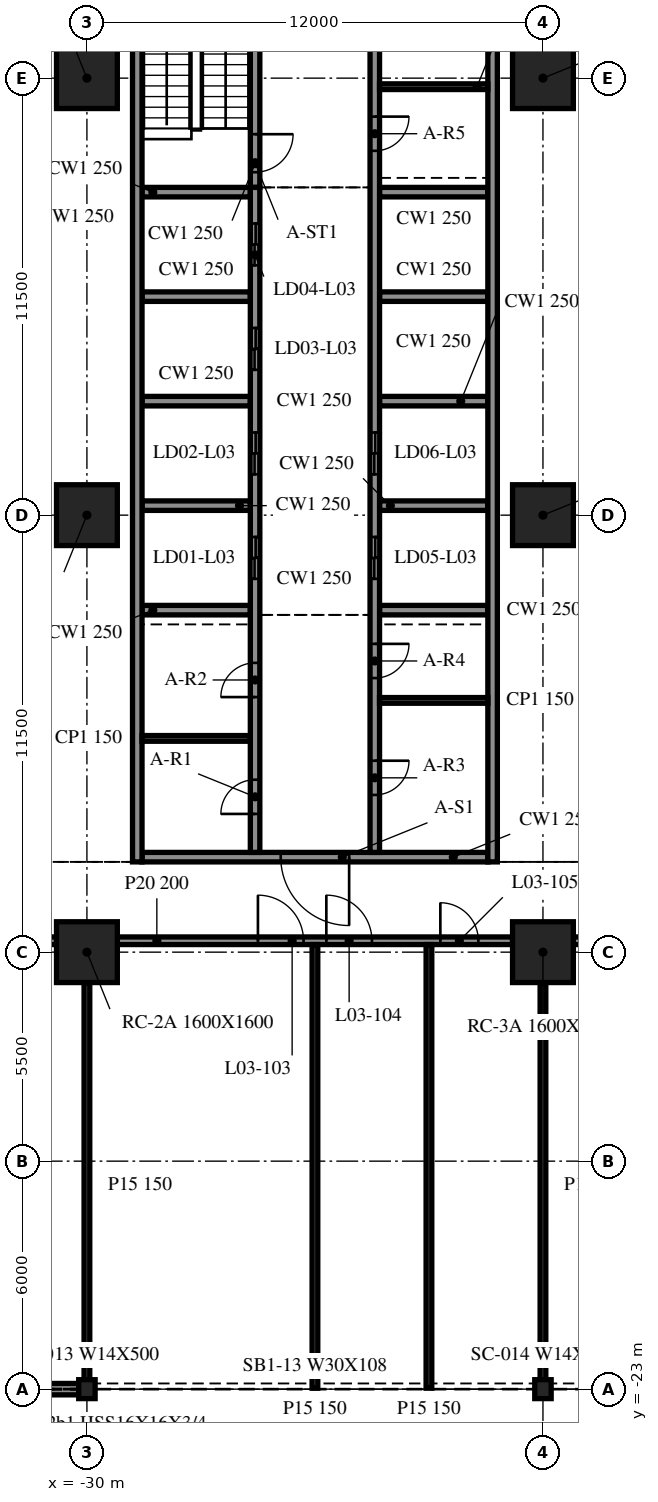
"""IFC4 building model, lengths in metres.
Left out: names, types, materials, properties, quantities, classifications, styles, units other than length and angle.
Written with IfcOpenShell. Run it as: python <this file> out.ifc"""

import sys

from ifc_helpers import new_model, si_unit, direction, frame, frame_2d, origin, origin_2d, place, context, subcontext, project, spatial, rectangle, i_section, extrude, element, fill, save


model = new_model("IFC4")
c1 = context("Model", 3, precision=1e-05, world=origin(), true_north=direction((0.0, 1.0)))
c2 = subcontext(c1, "Body", "Model", "MODEL_VIEW")
j1 = project(units=[si_unit("LENGTHUNIT", "METRE"), si_unit("PLANEANGLEUNIT", "RADIAN")], contexts=[c1])
p1 = place(None, origin())
s1 = spatial("IfcSite", under=j1, at=p1, CompositionType="ELEMENT")
p2 = place(p1, origin())
s2 = spatial("IfcBuilding", under=s1, at=p2, CompositionType="ELEMENT")
p3 = place(p2, frame((0.0, 0.0, 15.8)))
s3 = spatial("IfcBuildingStorey", under=s2, at=p3, CompositionType="ELEMENT", Elevation=15.8)
for number, where, z_axis, x_axis in (
    (1, (-30.0, -11.5, -0.34), (0.0, 0.0, 1.0), (1.0, 0.0, 0.0)),
    (2, (-30.0, 0.0, -0.34), (0.0, 0.0, 1.0), (1.0, 0.0, 0.0)),
    (3, (-30.0, 11.5, -0.34), (0.0, 0.0, 1.0), (1.0, 0.0, 0.0)),
    (4, (-18.0, -11.5, -0.34), (0.0, 0.0, 1.0), (1.0, 0.0, 0.0)),
    (5, (-18.0, 0.0, -0.34), (0.0, 0.0, 1.0), (1.0, 0.0, 0.0)),
    (6, (-18.0, 11.5, -0.34), (0.0, 0.0, 1.0), (1.0, 0.0, 0.0)),
):
    element("IfcColumn", number, at=place(p3, frame(where, z_axis=z_axis, x_axis=x_axis)), inside=s3, PredefinedType="COLUMN", context=c2, shape_type="SweptSolid", body=[
        extrude(rectangle(XDim=1.6, YDim=1.6, at=origin_2d()), origin(), (0.0, 0.0, 1.0), 4.3),
    ])
for number, where, z_axis, x_axis in (
    (7, (-30.0, -23.0, -0.34), (0.0, 0.0, 1.0), (1.0, 0.0, 0.0)),
    (8, (-18.0, -23.0, -0.34), (0.0, 0.0, 1.0), (1.0, 0.0, 0.0)),
):
    element("IfcColumn", number, at=place(p3, frame(where, z_axis=z_axis, x_axis=x_axis)), inside=s3, PredefinedType="COLUMN", context=c2, shape_type="SweptSolid", body=[
        extrude(i_section(OverallWidth=0.432, OverallDepth=0.498, WebThickness=0.056, FlangeThickness=0.089, at=origin_2d()), origin(), (0.0, 0.0, 1.0), 4.3),
    ])
p4 = place(p3, frame((-41.972, -23.0, 0.0), z_axis=(0.0, 0.0, 1.0), x_axis=(1.0, 0.0, 0.0)))
e9 = element("IfcWall", 9, at=p4, inside=s3, PredefinedType="NOTDEFINED", context=c2, shape_type="SweptSolid", body=[
    extrude(rectangle(XDim=11.944, YDim=0.3, at=frame_2d((5.972, 0.0))), origin(), (0.0, 0.0, 1.0), 3.203),
])
for number, where, z_axis, x_axis in (
    (10, (-28.675, 15.125, 0.0), (0.0, 0.0, 1.0), (0.0, -1.0, 0.0)),
    (11, (-19.325, -9.125, 0.0), (0.0, 0.0, 1.0), (0.0, 1.0, 0.0)),
):
    element("IfcWall", number, at=place(p3, frame(where, z_axis=z_axis, x_axis=x_axis)), inside=s3, PredefinedType="SOLIDWALL", context=c2, shape_type="SweptSolid", body=[
        extrude(rectangle(XDim=24.25, YDim=0.25, at=frame_2d((12.125, 0.0))), origin(), (0.0, 0.0, 1.0), 3.96),
    ])
p5 = place(p3, frame((-19.45, -9.0, 0.0), z_axis=(0.0, 0.0, 1.0), x_axis=(-1.0, 0.0, 0.0)))
e12 = element("IfcWall", 12, at=p5, inside=s3, PredefinedType="SOLIDWALL", context=c2, shape_type="SweptSolid", body=[
    extrude(rectangle(XDim=9.1, YDim=0.25, at=frame_2d((4.55, 0.0))), origin(), (0.0, 0.0, 1.0), 3.96),
])
p6 = place(p5, frame((3.65, 0.0, 0.0)))
e13 = element("IfcOpeningElement", 13, at=p6, cuts=e12, PredefinedType="OPENING", context=c2, shape_type="SweptSolid", body=[
    extrude(rectangle(XDim=1.8, YDim=2.1, at=frame_2d((0.9, 1.05))), frame((0.0, 0.135, 0.0), z_axis=(0.0, -1.0, 0.0), x_axis=(1.0, 0.0, 0.0)), (0.0, 0.0, 1.0), 0.27),
])
p7 = place(p3, frame((-25.575, -8.875, 0.0), z_axis=(0.0, 0.0, 1.0), x_axis=(0.0, 1.0, 0.0)))
e14 = element("IfcWall", 14, at=p7, inside=s3, PredefinedType="SOLIDWALL", context=c2, shape_type="SweptSolid", body=[
    extrude(rectangle(XDim=17.5, YDim=0.25, at=frame_2d((8.75, 0.0))), origin(), (0.0, 0.0, 1.0), 3.96),
])
p8 = place(p7, frame((7.2, 0.0, 0.0)))
e15 = element("IfcOpeningElement", 15, at=p8, cuts=e14, PredefinedType="OPENING", context=c2, shape_type="SweptSolid", body=[
    extrude(rectangle(XDim=1.1, YDim=2.1, at=frame_2d((0.55, 1.05))), frame((0.0, 0.135, 0.0), z_axis=(0.0, -1.0, 0.0), x_axis=(1.0, 0.0, 0.0)), (0.0, 0.0, 1.0), 0.27),
])
p9 = place(p7, frame((9.95, 0.0, 0.0)))
e16 = element("IfcOpeningElement", 16, at=p9, cuts=e14, PredefinedType="OPENING", context=c2, shape_type="SweptSolid", body=[
    extrude(rectangle(XDim=1.1, YDim=2.1, at=frame_2d((0.55, 1.05))), frame((0.0, 0.135, 0.0), z_axis=(0.0, -1.0, 0.0), x_axis=(1.0, 0.0, 0.0)), (0.0, 0.0, 1.0), 0.27),
])
p10 = place(p7, frame((12.7, 0.0, 0.0)))
e17 = element("IfcOpeningElement", 17, at=p10, cuts=e14, PredefinedType="OPENING", context=c2, shape_type="SweptSolid", body=[
    extrude(rectangle(XDim=1.1, YDim=2.1, at=frame_2d((0.55, 1.05))), frame((0.0, 0.135, 0.0), z_axis=(0.0, -1.0, 0.0), x_axis=(1.0, 0.0, 0.0)), (0.0, 0.0, 1.0), 0.27),
])
p11 = place(p7, frame((15.45, 0.0, 0.0)))
e18 = element("IfcOpeningElement", 18, at=p11, cuts=e14, PredefinedType="OPENING", context=c2, shape_type="SweptSolid", body=[
    extrude(rectangle(XDim=1.1, YDim=2.1, at=frame_2d((0.55, 1.05))), frame((0.0, 0.135, 0.0), z_axis=(0.0, -1.0, 0.0), x_axis=(1.0, 0.0, 0.0)), (0.0, 0.0, 1.0), 0.27),
])
p12 = place(p7, frame((1.012, 0.0, 0.0)))
e19 = element("IfcOpeningElement", 19, at=p12, cuts=e14, PredefinedType="OPENING", context=c2, shape_type="SweptSolid", body=[
    extrude(rectangle(XDim=0.9, YDim=2.1, at=frame_2d((0.45, 1.05))), frame((0.0, 0.135, 0.0), z_axis=(0.0, -1.0, 0.0), x_axis=(1.0, 0.0, 0.0)), (0.0, 0.0, 1.0), 0.27),
])
p13 = place(p7, frame((4.087, 0.0, 0.0)))
e20 = element("IfcOpeningElement", 20, at=p13, cuts=e14, PredefinedType="OPENING", context=c2, shape_type="SweptSolid", body=[
    extrude(rectangle(XDim=0.9, YDim=2.1, at=frame_2d((0.45, 1.05))), frame((0.0, 0.135, 0.0), z_axis=(0.0, -1.0, 0.0), x_axis=(1.0, 0.0, 0.0)), (0.0, 0.0, 1.0), 0.27),
])
p14 = place(p3, frame((-25.575, 14.875, 0.0), z_axis=(0.0, 0.0, 1.0), x_axis=(0.0, -1.0, 0.0)))
e21 = element("IfcWall", 21, at=p14, inside=s3, PredefinedType="SOLIDWALL", context=c2, shape_type="SweptSolid", body=[
    extrude(rectangle(XDim=6.25, YDim=0.25, at=frame_2d((3.125, 0.0))), origin(), (0.0, 0.0, 1.0), 3.96),
])
p15 = place(p14, frame((4.85, 0.0, 0.0)))
e22 = element("IfcOpeningElement", 22, at=p15, cuts=e21, PredefinedType="OPENING", context=c2, shape_type="SweptSolid", body=[
    extrude(rectangle(XDim=1.0, YDim=2.1, at=frame_2d((0.5, 1.05))), frame((0.0, 0.135, 0.0), z_axis=(0.0, -1.0, 0.0), x_axis=(1.0, 0.0, 0.0)), (0.0, 0.0, 1.0), 0.27),
])
p16 = place(p3, frame((-22.425, 14.875, 0.0), z_axis=(0.0, 0.0, 1.0), x_axis=(0.0, -1.0, 0.0)))
e23 = element("IfcWall", 23, at=p16, inside=s3, PredefinedType="SOLIDWALL", context=c2, shape_type="SweptSolid", body=[
    extrude(rectangle(XDim=23.75, YDim=0.25, at=frame_2d((11.875, 0.0))), origin(), (0.0, 0.0, 1.0), 3.96),
])
p17 = place(p16, frame((15.45, 0.0, 0.0)))
e24 = element("IfcOpeningElement", 24, at=p17, cuts=e23, PredefinedType="OPENING", context=c2, shape_type="SweptSolid", body=[
    extrude(rectangle(XDim=1.1, YDim=2.1, at=frame_2d((0.55, 1.05))), frame((0.0, 0.135, 0.0), z_axis=(0.0, -1.0, 0.0), x_axis=(1.0, 0.0, 0.0)), (0.0, 0.0, 1.0), 0.27),
])
p18 = place(p16, frame((12.7, 0.0, 0.0)))
e25 = element("IfcOpeningElement", 25, at=p18, cuts=e23, PredefinedType="OPENING", context=c2, shape_type="SweptSolid", body=[
    extrude(rectangle(XDim=1.1, YDim=2.1, at=frame_2d((0.55, 1.05))), frame((0.0, 0.135, 0.0), z_axis=(0.0, -1.0, 0.0), x_axis=(1.0, 0.0, 0.0)), (0.0, 0.0, 1.0), 0.27),
])
p19 = place(p16, frame((21.337, 0.0, 0.0)))
e26 = element("IfcOpeningElement", 26, at=p19, cuts=e23, PredefinedType="OPENING", context=c2, shape_type="SweptSolid", body=[
    extrude(rectangle(XDim=0.9, YDim=2.1, at=frame_2d((0.45, 1.05))), frame((0.0, 0.135, 0.0), z_axis=(0.0, -1.0, 0.0), x_axis=(1.0, 0.0, 0.0)), (0.0, 0.0, 1.0), 0.27),
])
p20 = place(p16, frame((18.262, 0.0, 0.0)))
e27 = element("IfcOpeningElement", 27, at=p20, cuts=e23, PredefinedType="OPENING", context=c2, shape_type="SweptSolid", body=[
    extrude(rectangle(XDim=0.9, YDim=2.1, at=frame_2d((0.45, 1.05))), frame((0.0, 0.135, 0.0), z_axis=(0.0, -1.0, 0.0), x_axis=(1.0, 0.0, 0.0)), (0.0, 0.0, 1.0), 0.27),
])
p21 = place(p16, frame((4.387, 0.0, 0.0)))
e28 = element("IfcOpeningElement", 28, at=p21, cuts=e23, PredefinedType="OPENING", context=c2, shape_type="SweptSolid", body=[
    extrude(rectangle(XDim=0.9, YDim=2.1, at=frame_2d((0.45, 1.05))), frame((0.0, 0.135, 0.0), z_axis=(0.0, -1.0, 0.0), x_axis=(1.0, 0.0, 0.0)), (0.0, 0.0, 1.0), 0.27),
])
p22 = place(p16, frame((1.312, 0.0, 0.0)))
e29 = element("IfcOpeningElement", 29, at=p22, cuts=e23, PredefinedType="OPENING", context=c2, shape_type="SweptSolid", body=[
    extrude(rectangle(XDim=0.9, YDim=2.1, at=frame_2d((0.45, 1.05))), frame((0.0, 0.135, 0.0), z_axis=(0.0, -1.0, 0.0), x_axis=(1.0, 0.0, 0.0)), (0.0, 0.0, 1.0), 0.27),
])
for number, where, z_axis, x_axis in (
    (30, (-28.55, -2.5, 0.0), (0.0, 0.0, 1.0), (1.0, 0.0, 0.0)),
    (31, (-28.55, 0.25, 0.0), (0.0, 0.0, 1.0), (1.0, 0.0, 0.0)),
    (32, (-28.55, 3.0, 0.0), (0.0, 0.0, 1.0), (1.0, 0.0, 0.0)),
    (33, (-28.55, 5.75, 0.0), (0.0, 0.0, 1.0), (1.0, 0.0, 0.0)),
    (34, (-28.55, 8.5, 0.0), (0.0, 0.0, 1.0), (1.0, 0.0, 0.0)),
    (35, (-22.3, -2.5, 0.0), (0.0, 0.0, 1.0), (1.0, 0.0, 0.0)),
    (36, (-22.3, 0.25, 0.0), (0.0, 0.0, 1.0), (1.0, 0.0, 0.0)),
    (37, (-22.3, 3.0, 0.0), (0.0, 0.0, 1.0), (1.0, 0.0, 0.0)),
    (38, (-22.3, 5.75, 0.0), (0.0, 0.0, 1.0), (1.0, 0.0, 0.0)),
    (39, (-22.3, 8.5, 0.0), (0.0, 0.0, 1.0), (1.0, 0.0, 0.0)),
):
    element("IfcWall", number, at=place(p3, frame(where, z_axis=z_axis, x_axis=x_axis)), inside=s3, PredefinedType="SOLIDWALL", context=c2, shape_type="SweptSolid", body=[
        extrude(rectangle(XDim=2.85, YDim=0.25, at=frame_2d((1.425, 0.0))), origin(), (0.0, 0.0, 1.0), 3.96),
    ])
for number, where, z_axis, x_axis in (
    (40, (-28.55, -5.875, 0.0), (0.0, 0.0, 1.0), (1.0, 0.0, 0.0)),
    (41, (-22.3, -4.875, 0.0), (0.0, 0.0, 1.0), (1.0, 0.0, 0.0)),
    (42, (-22.3, 11.275, 0.0), (0.0, 0.0, 1.0), (1.0, 0.0, 0.0)),
):
    element("IfcWall", number, at=place(p3, frame(where, z_axis=z_axis, x_axis=x_axis)), inside=s3, PredefinedType="PARTITIONING", context=c2, shape_type="SweptSolid", body=[
        extrude(rectangle(XDim=2.85, YDim=0.15, at=frame_2d((1.425, 0.0))), origin(), (0.0, 0.0, 1.0), 3.96),
    ])
p23 = place(p3, frame((-41.2, -11.2, 0.0), z_axis=(0.0, 0.0, 1.0), x_axis=(1.0, 0.0, 0.0)))
e43 = element("IfcWall", 43, at=p23, inside=s3, PredefinedType="PARTITIONING", context=c2, shape_type="SweptSolid", body=[
    extrude(rectangle(XDim=10.4, YDim=0.2, at=frame_2d((5.2, 0.0))), origin(), (0.0, 0.0, 1.0), 3.96),
])
p24 = place(p23, frame((5.5, 0.0, 0.0)))
e44 = element("IfcOpeningElement", 44, at=p24, cuts=e43, PredefinedType="OPENING", context=c2, shape_type="SweptSolid", body=[
    extrude(rectangle(XDim=1.2, YDim=2.1, at=frame_2d((0.6, 1.05))), frame((0.0, 0.11, 0.0), z_axis=(0.0, -1.0, 0.0), x_axis=(1.0, 0.0, 0.0)), (0.0, 0.0, 1.0), 0.22),
])
p25 = place(p3, frame((-29.2, -11.2, 0.0), z_axis=(0.0, 0.0, 1.0), x_axis=(1.0, 0.0, 0.0)))
e45 = element("IfcWall", 45, at=p25, inside=s3, PredefinedType="PARTITIONING", context=c2, shape_type="SweptSolid", body=[
    extrude(rectangle(XDim=10.4, YDim=0.2, at=frame_2d((5.2, 0.0))), origin(), (0.0, 0.0, 1.0), 3.96),
])
p26 = place(p25, frame((3.7, 0.0, 0.0)))
e46 = element("IfcOpeningElement", 46, at=p26, cuts=e45, PredefinedType="OPENING", context=c2, shape_type="SweptSolid", body=[
    extrude(rectangle(XDim=1.2, YDim=2.1, at=frame_2d((0.6, 1.05))), frame((0.0, 0.11, 0.0), z_axis=(0.0, -1.0, 0.0), x_axis=(1.0, 0.0, 0.0)), (0.0, 0.0, 1.0), 0.22),
])
p27 = place(p25, frame((5.5, 0.0, 0.0)))
e47 = element("IfcOpeningElement", 47, at=p27, cuts=e45, PredefinedType="OPENING", context=c2, shape_type="SweptSolid", body=[
    extrude(rectangle(XDim=1.2, YDim=2.1, at=frame_2d((0.6, 1.05))), frame((0.0, 0.11, 0.0), z_axis=(0.0, -1.0, 0.0), x_axis=(1.0, 0.0, 0.0)), (0.0, 0.0, 1.0), 0.22),
])
p28 = place(p25, frame((8.5, 0.0, 0.0)))
e48 = element("IfcOpeningElement", 48, at=p28, cuts=e45, PredefinedType="OPENING", context=c2, shape_type="SweptSolid", body=[
    extrude(rectangle(XDim=1.0, YDim=2.1, at=frame_2d((0.5, 1.05))), frame((0.0, 0.11, 0.0), z_axis=(0.0, -1.0, 0.0), x_axis=(1.0, 0.0, 0.0)), (0.0, 0.0, 1.0), 0.22),
])
p29 = place(p3, frame((-17.2, -11.2, 0.0), z_axis=(0.0, 0.0, 1.0), x_axis=(1.0, 0.0, 0.0)))
e49 = element("IfcWall", 49, at=p29, inside=s3, PredefinedType="PARTITIONING", context=c2, shape_type="SweptSolid", body=[
    extrude(rectangle(XDim=10.4, YDim=0.2, at=frame_2d((5.2, 0.0))), origin(), (0.0, 0.0, 1.0), 3.96),
])
p30 = place(p29, frame((3.7, 0.0, 0.0)))
e50 = element("IfcOpeningElement", 50, at=p30, cuts=e49, PredefinedType="OPENING", context=c2, shape_type="SweptSolid", body=[
    extrude(rectangle(XDim=1.2, YDim=2.1, at=frame_2d((0.6, 1.05))), frame((0.0, 0.11, 0.0), z_axis=(0.0, -1.0, 0.0), x_axis=(1.0, 0.0, 0.0)), (0.0, 0.0, 1.0), 0.22),
])
p31 = place(p29, frame((5.5, 0.0, 0.0)))
e51 = element("IfcOpeningElement", 51, at=p31, cuts=e49, PredefinedType="OPENING", context=c2, shape_type="SweptSolid", body=[
    extrude(rectangle(XDim=1.2, YDim=2.1, at=frame_2d((0.6, 1.05))), frame((0.0, 0.11, 0.0), z_axis=(0.0, -1.0, 0.0), x_axis=(1.0, 0.0, 0.0)), (0.0, 0.0, 1.0), 0.22),
])
p32 = place(p3, frame((-30.0, -22.975, 0.0), z_axis=(0.0, 0.0, 1.0), x_axis=(0.0, 1.0, 0.0)))
e52 = element("IfcWall", 52, at=p32, inside=s3, PredefinedType="PARTITIONING", context=c2, shape_type="SweptSolid", body=[
    extrude(rectangle(XDim=10.675, YDim=0.15, at=frame_2d((5.337, 0.0))), origin(), (0.0, 0.0, 1.0), 3.96),
])
for number, where, z_axis, x_axis in (
    (53, (-24.0, -22.975, 0.0), (0.0, 0.0, 1.0), (0.0, 1.0, 0.0)),
    (54, (-21.0, -22.975, 0.0), (0.0, 0.0, 1.0), (0.0, 1.0, 0.0)),
):
    element("IfcWall", number, at=place(p3, frame(where, z_axis=z_axis, x_axis=x_axis)), inside=s3, PredefinedType="PARTITIONING", context=c2, shape_type="SweptSolid", body=[
        extrude(rectangle(XDim=11.675, YDim=0.15, at=frame_2d((5.837, 0.0))), origin(), (0.0, 0.0, 1.0), 3.96),
    ])
p33 = place(p3, frame((-18.0, -22.975, 0.0), z_axis=(0.0, 0.0, 1.0), x_axis=(0.0, 1.0, 0.0)))
e55 = element("IfcWall", 55, at=p33, inside=s3, PredefinedType="PARTITIONING", context=c2, shape_type="SweptSolid", body=[
    extrude(rectangle(XDim=10.675, YDim=0.15, at=frame_2d((5.337, 0.0))), origin(), (0.0, 0.0, 1.0), 3.96),
])
p34 = place(p6, origin())
e56 = element("IfcDoor", 56, at=p34, inside=s3, OperationType="DOUBLE_DOOR_SINGLE_SWING", PredefinedType="DOOR", context=c2, shape_type="SweptSolid", body=[
    extrude(rectangle(XDim=1.8, YDim=2.1, at=frame_2d((0.9, 1.05))), frame((0.0, 0.025, 0.0), z_axis=(0.0, -1.0, 0.0), x_axis=(1.0, 0.0, 0.0)), (0.0, 0.0, 1.0), 0.05),
])
fill(e13, e56)
p35 = place(p17, origin())
e57 = element("IfcDoor", 57, at=p35, inside=s3, OperationType="DOUBLE_DOOR_SLIDING", PredefinedType="DOOR", context=c2, shape_type="SweptSolid", body=[
    extrude(rectangle(XDim=1.1, YDim=2.1, at=frame_2d((0.55, 1.05))), frame((0.0, 0.025, 0.0), z_axis=(0.0, -1.0, 0.0), x_axis=(1.0, 0.0, 0.0)), (0.0, 0.0, 1.0), 0.05),
])
fill(e24, e57)
p36 = place(p18, origin())
e58 = element("IfcDoor", 58, at=p36, inside=s3, OperationType="DOUBLE_DOOR_SLIDING", PredefinedType="DOOR", context=c2, shape_type="SweptSolid", body=[
    extrude(rectangle(XDim=1.1, YDim=2.1, at=frame_2d((0.55, 1.05))), frame((0.0, 0.025, 0.0), z_axis=(0.0, -1.0, 0.0), x_axis=(1.0, 0.0, 0.0)), (0.0, 0.0, 1.0), 0.05),
])
fill(e25, e58)
p37 = place(p8, origin())
e59 = element("IfcDoor", 59, at=p37, inside=s3, OperationType="DOUBLE_DOOR_SLIDING", PredefinedType="DOOR", context=c2, shape_type="SweptSolid", body=[
    extrude(rectangle(XDim=1.1, YDim=2.1, at=frame_2d((0.55, 1.05))), frame((0.0, 0.025, 0.0), z_axis=(0.0, -1.0, 0.0), x_axis=(1.0, 0.0, 0.0)), (0.0, 0.0, 1.0), 0.05),
])
fill(e15, e59)
p38 = place(p9, origin())
e60 = element("IfcDoor", 60, at=p38, inside=s3, OperationType="DOUBLE_DOOR_SLIDING", PredefinedType="DOOR", context=c2, shape_type="SweptSolid", body=[
    extrude(rectangle(XDim=1.1, YDim=2.1, at=frame_2d((0.55, 1.05))), frame((0.0, 0.025, 0.0), z_axis=(0.0, -1.0, 0.0), x_axis=(1.0, 0.0, 0.0)), (0.0, 0.0, 1.0), 0.05),
])
fill(e16, e60)
p39 = place(p10, origin())
e61 = element("IfcDoor", 61, at=p39, inside=s3, OperationType="DOUBLE_DOOR_SLIDING", PredefinedType="DOOR", context=c2, shape_type="SweptSolid", body=[
    extrude(rectangle(XDim=1.1, YDim=2.1, at=frame_2d((0.55, 1.05))), frame((0.0, 0.025, 0.0), z_axis=(0.0, -1.0, 0.0), x_axis=(1.0, 0.0, 0.0)), (0.0, 0.0, 1.0), 0.05),
])
fill(e17, e61)
p40 = place(p11, origin())
e62 = element("IfcDoor", 62, at=p40, inside=s3, OperationType="DOUBLE_DOOR_SLIDING", PredefinedType="DOOR", context=c2, shape_type="SweptSolid", body=[
    extrude(rectangle(XDim=1.1, YDim=2.1, at=frame_2d((0.55, 1.05))), frame((0.0, 0.025, 0.0), z_axis=(0.0, -1.0, 0.0), x_axis=(1.0, 0.0, 0.0)), (0.0, 0.0, 1.0), 0.05),
])
fill(e18, e62)
p41 = place(p12, origin())
e63 = element("IfcDoor", 63, at=p41, inside=s3, OperationType="SINGLE_SWING_LEFT", PredefinedType="DOOR", context=c2, shape_type="SweptSolid", body=[
    extrude(rectangle(XDim=0.9, YDim=2.1, at=frame_2d((0.45, 1.05))), frame((0.0, 0.025, 0.0), z_axis=(0.0, -1.0, 0.0), x_axis=(1.0, 0.0, 0.0)), (0.0, 0.0, 1.0), 0.05),
])
fill(e19, e63)
p42 = place(p13, origin())
e64 = element("IfcDoor", 64, at=p42, inside=s3, OperationType="SINGLE_SWING_RIGHT", PredefinedType="DOOR", context=c2, shape_type="SweptSolid", body=[
    extrude(rectangle(XDim=0.9, YDim=2.1, at=frame_2d((0.45, 1.05))), frame((0.0, 0.025, 0.0), z_axis=(0.0, -1.0, 0.0), x_axis=(1.0, 0.0, 0.0)), (0.0, 0.0, 1.0), 0.05),
])
fill(e20, e64)
p43 = place(p19, origin())
e65 = element("IfcDoor", 65, at=p43, inside=s3, OperationType="SINGLE_SWING_LEFT", PredefinedType="DOOR", context=c2, shape_type="SweptSolid", body=[
    extrude(rectangle(XDim=0.9, YDim=2.1, at=frame_2d((0.45, 1.05))), frame((0.0, 0.025, 0.0), z_axis=(0.0, -1.0, 0.0), x_axis=(1.0, 0.0, 0.0)), (0.0, 0.0, 1.0), 0.05),
])
fill(e26, e65)
p44 = place(p20, origin())
e66 = element("IfcDoor", 66, at=p44, inside=s3, OperationType="SINGLE_SWING_RIGHT", PredefinedType="DOOR", context=c2, shape_type="SweptSolid", body=[
    extrude(rectangle(XDim=0.9, YDim=2.1, at=frame_2d((0.45, 1.05))), frame((0.0, 0.025, 0.0), z_axis=(0.0, -1.0, 0.0), x_axis=(1.0, 0.0, 0.0)), (0.0, 0.0, 1.0), 0.05),
])
fill(e27, e66)
p45 = place(p21, origin())
e67 = element("IfcDoor", 67, at=p45, inside=s3, OperationType="SINGLE_SWING_LEFT", PredefinedType="DOOR", context=c2, shape_type="SweptSolid", body=[
    extrude(rectangle(XDim=0.9, YDim=2.1, at=frame_2d((0.45, 1.05))), frame((0.0, 0.025, 0.0), z_axis=(0.0, -1.0, 0.0), x_axis=(1.0, 0.0, 0.0)), (0.0, 0.0, 1.0), 0.05),
])
fill(e28, e67)
p46 = place(p15, origin())
e68 = element("IfcDoor", 68, at=p46, inside=s3, OperationType="SINGLE_SWING_LEFT", PredefinedType="DOOR", context=c2, shape_type="SweptSolid", body=[
    extrude(rectangle(XDim=1.0, YDim=2.1, at=frame_2d((0.5, 1.05))), frame((0.0, 0.025, 0.0), z_axis=(0.0, -1.0, 0.0), x_axis=(1.0, 0.0, 0.0)), (0.0, 0.0, 1.0), 0.05),
])
fill(e22, e68)
p47 = place(p26, origin())
e69 = element("IfcDoor", 69, at=p47, inside=s3, OperationType="SINGLE_SWING_RIGHT", PredefinedType="DOOR", context=c2, shape_type="SweptSolid", body=[
    extrude(rectangle(XDim=1.2, YDim=2.1, at=frame_2d((0.6, 1.05))), frame((0.0, 0.025, 0.0), z_axis=(0.0, -1.0, 0.0), x_axis=(1.0, 0.0, 0.0)), (0.0, 0.0, 1.0), 0.05),
])
fill(e46, e69)
p48 = place(p27, origin())
e70 = element("IfcDoor", 70, at=p48, inside=s3, OperationType="SINGLE_SWING_LEFT", PredefinedType="DOOR", context=c2, shape_type="SweptSolid", body=[
    extrude(rectangle(XDim=1.2, YDim=2.1, at=frame_2d((0.6, 1.05))), frame((0.0, 0.025, 0.0), z_axis=(0.0, -1.0, 0.0), x_axis=(1.0, 0.0, 0.0)), (0.0, 0.0, 1.0), 0.05),
])
fill(e47, e70)
p49 = place(p28, origin())
e71 = element("IfcDoor", 71, at=p49, inside=s3, OperationType="SINGLE_SWING_LEFT", PredefinedType="DOOR", context=c2, shape_type="SweptSolid", body=[
    extrude(rectangle(XDim=1.0, YDim=2.1, at=frame_2d((0.5, 1.05))), frame((0.0, 0.025, 0.0), z_axis=(0.0, -1.0, 0.0), x_axis=(1.0, 0.0, 0.0)), (0.0, 0.0, 1.0), 0.05),
])
fill(e48, e71)
save(model, sys.argv[1])
